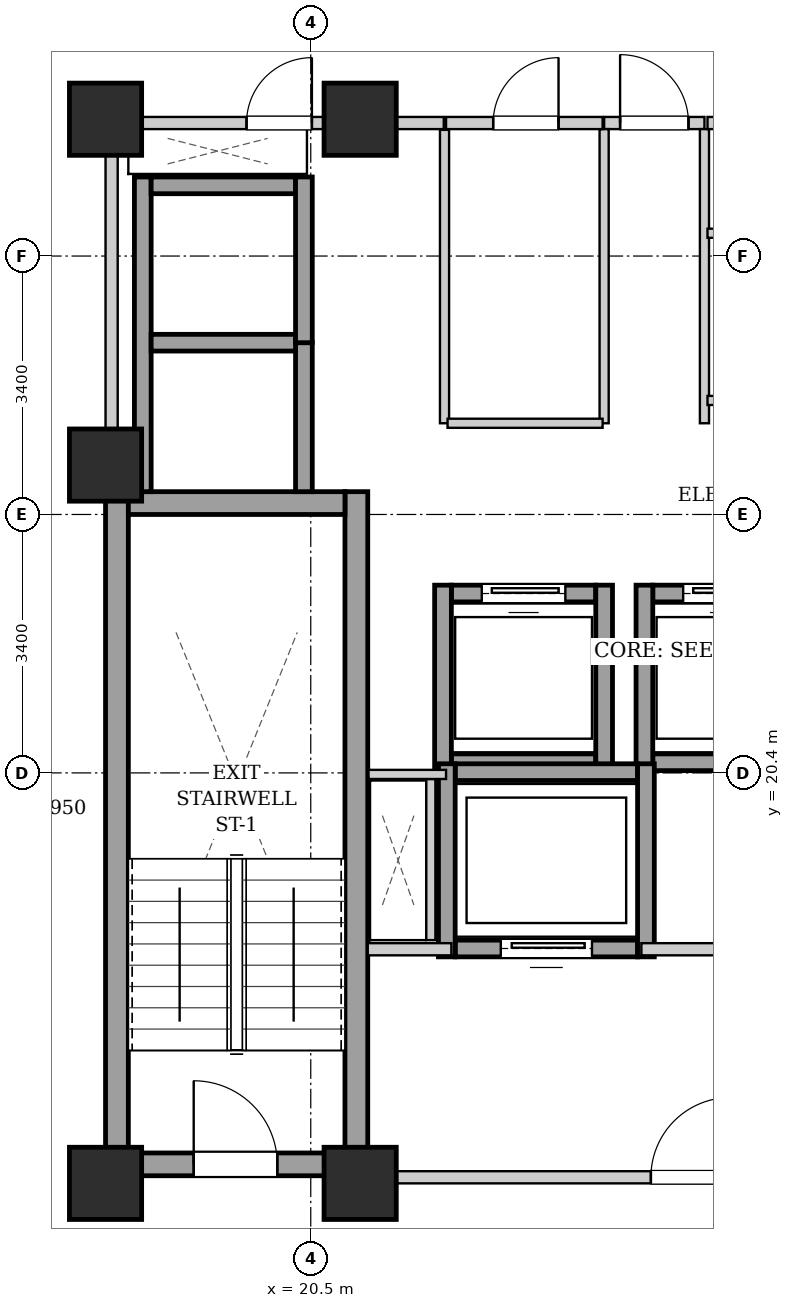
"""IFC4 building model, lengths in metres.
Left out: names, types, materials, properties, quantities, classifications, styles, units other than length and angle.
Written with IfcOpenShell. Run it as: python <this file> out.ifc"""

import sys

from ifc_helpers import new_model, si_unit, direction, frame, frame_2d, origin, origin_2d, place, context, subcontext, project, spatial, rectangle, extrude, element, fill, save


model = new_model("IFC4")
c1 = context("Model", 3, precision=1e-05, world=origin(), true_north=direction((0.0, 1.0)))
c2 = subcontext(c1, "Body", "Model", "MODEL_VIEW")
j1 = project(units=[si_unit("LENGTHUNIT", "METRE"), si_unit("PLANEANGLEUNIT", "RADIAN")], contexts=[c1])
p1 = place(None, origin())
s1 = spatial("IfcSite", under=j1, at=p1, CompositionType="ELEMENT")
p2 = place(p1, origin())
s2 = spatial("IfcBuilding", under=s1, at=p2, CompositionType="ELEMENT")
p3 = place(p2, frame((0.0, 0.0, 156.9)))
s3 = spatial("IfcBuildingStorey", under=s2, at=p3, CompositionType="ELEMENT", Elevation=156.9)
for number, where, z_axis, x_axis in (
    (1, (17.8, 15.0, 0.0), (0.0, 0.0, 1.0), (1.0, 0.0, 0.0)),
    (2, (21.15, 15.0, 0.0), (0.0, 0.0, 1.0), (1.0, 0.0, 0.0)),
    (3, (17.8, 29.0, 0.0), (0.0, 0.0, 1.0), (1.0, 0.0, 0.0)),
    (4, (21.15, 29.0, 0.0), (0.0, 0.0, 1.0), (1.0, 0.0, 0.0)),
    (5, (17.8, 24.45, 0.0), (0.0, 0.0, 1.0), (1.0, 0.0, 0.0)),
):
    element("IfcColumn", number, at=place(p3, frame(where, z_axis=z_axis, x_axis=x_axis)), inside=s3, PredefinedType="COLUMN", context=c2, shape_type="SweptSolid", body=[
        extrude(rectangle(XDim=0.95, YDim=0.95, at=origin_2d()), origin(), (0.0, 0.0, 1.0), 3.25),
    ])
for number, where, z_axis, x_axis in (
    (6, (17.95, 15.1, 0.0), (0.0, 0.0, 1.0), (0.0, 1.0, 0.0)),
    (7, (21.1, 15.1, 0.0), (0.0, 0.0, 1.0), (0.0, 1.0, 0.0)),
):
    element("IfcWall", number, at=place(p3, frame(where, z_axis=z_axis, x_axis=x_axis)), inside=s3, PredefinedType="SHEAR", context=c2, shape_type="SweptSolid", body=[
        extrude(rectangle(XDim=9.0, YDim=0.3, at=frame_2d((4.5, 0.0))), origin(), (0.0, 0.0, 1.0), 2.99),
    ])
p4 = place(p3, frame((18.1, 23.95, 0.0), z_axis=(0.0, 0.0, 1.0), x_axis=(1.0, 0.0, 0.0)))
e8 = element("IfcWall", 8, at=p4, inside=s3, PredefinedType="SHEAR", context=c2, shape_type="SweptSolid", body=[
    extrude(rectangle(XDim=2.85, YDim=0.3, at=frame_2d((1.425, 0.0))), origin(), (0.0, 0.0, 1.0), 2.99),
])
p5 = place(p3, frame((18.1, 15.25, 0.0), z_axis=(0.0, 0.0, 1.0), x_axis=(1.0, 0.0, 0.0)))
e9 = element("IfcWall", 9, at=p5, inside=s3, PredefinedType="SHEAR", context=c2, shape_type="SweptSolid", body=[
    extrude(rectangle(XDim=2.85, YDim=0.3, at=frame_2d((1.425, 0.0))), origin(), (0.0, 0.0, 1.0), 2.99),
])
p6 = place(p5, frame((0.86, 0.0, 0.0)))
e10 = element("IfcOpeningElement", 10, at=p6, cuts=e9, PredefinedType="OPENING", context=c2, shape_type="SweptSolid", body=[
    extrude(rectangle(XDim=1.1, YDim=2.05, at=frame_2d((0.55, 1.025))), frame((0.0, 0.16, 0.0), z_axis=(0.0, -1.0, 0.0), x_axis=(1.0, 0.0, 0.0)), (0.0, 0.0, 1.0), 0.32),
])
p7 = place(p3, frame((22.35, 20.54, 0.0), z_axis=(0.0, 0.0, 1.0), x_axis=(1.0, 0.0, 0.0)))
e11 = element("IfcWall", 11, at=p7, inside=s3, PredefinedType="SHEAR", context=c2, shape_type="SweptSolid", body=[
    extrude(rectangle(XDim=1.9, YDim=0.22, at=frame_2d((0.95, 0.0))), origin(), (0.0, 0.0, 1.0), 2.99),
])
p8 = place(p3, frame((22.35, 22.76, 0.0), z_axis=(0.0, 0.0, 1.0), x_axis=(1.0, 0.0, 0.0)))
e12 = element("IfcWall", 12, at=p8, inside=s3, PredefinedType="SHEAR", context=c2, shape_type="SweptSolid", body=[
    extrude(rectangle(XDim=1.9, YDim=0.22, at=frame_2d((0.95, 0.0))), origin(), (0.0, 0.0, 1.0), 2.99),
])
p9 = place(p8, frame((0.4, 0.0, 0.0)))
e13 = element("IfcOpeningElement", 13, at=p9, cuts=e12, PredefinedType="OPENING", context=c2, shape_type="SweptSolid", body=[
    extrude(rectangle(XDim=1.1, YDim=2.15, at=frame_2d((0.55, 1.075))), frame((0.0, 0.12, 0.0), z_axis=(0.0, -1.0, 0.0), x_axis=(1.0, 0.0, 0.0)), (0.0, 0.0, 1.0), 0.24),
])
for number, where, z_axis, x_axis in (
    (14, (22.24, 20.43, 0.0), (0.0, 0.0, 1.0), (0.0, 1.0, 0.0)),
    (15, (24.36, 20.43, 0.0), (0.0, 0.0, 1.0), (0.0, 1.0, 0.0)),
):
    element("IfcWall", number, at=place(p3, frame(where, z_axis=z_axis, x_axis=x_axis)), inside=s3, PredefinedType="SHEAR", context=c2, shape_type="SweptSolid", body=[
        extrude(rectangle(XDim=2.44, YDim=0.22, at=frame_2d((1.22, 0.0))), origin(), (0.0, 0.0, 1.0), 2.99),
    ])
p10 = place(p3, frame((25.0, 20.54, 0.0), z_axis=(0.0, 0.0, 1.0), x_axis=(1.0, 0.0, 0.0)))
e16 = element("IfcWall", 16, at=p10, inside=s3, PredefinedType="SHEAR", context=c2, shape_type="SweptSolid", body=[
    extrude(rectangle(XDim=1.9, YDim=0.22, at=frame_2d((0.95, 0.0))), origin(), (0.0, 0.0, 1.0), 2.99),
])
p11 = place(p3, frame((25.0, 22.76, 0.0), z_axis=(0.0, 0.0, 1.0), x_axis=(1.0, 0.0, 0.0)))
e17 = element("IfcWall", 17, at=p11, inside=s3, PredefinedType="SHEAR", context=c2, shape_type="SweptSolid", body=[
    extrude(rectangle(XDim=1.9, YDim=0.22, at=frame_2d((0.95, 0.0))), origin(), (0.0, 0.0, 1.0), 2.99),
])
p12 = place(p11, frame((0.4, 0.0, 0.0)))
e18 = element("IfcOpeningElement", 18, at=p12, cuts=e17, PredefinedType="OPENING", context=c2, shape_type="SweptSolid", body=[
    extrude(rectangle(XDim=1.1, YDim=2.15, at=frame_2d((0.55, 1.075))), frame((0.0, 0.12, 0.0), z_axis=(0.0, -1.0, 0.0), x_axis=(1.0, 0.0, 0.0)), (0.0, 0.0, 1.0), 0.24),
])
p13 = place(p3, frame((24.89, 20.43, 0.0), z_axis=(0.0, 0.0, 1.0), x_axis=(0.0, 1.0, 0.0)))
e19 = element("IfcWall", 19, at=p13, inside=s3, PredefinedType="SHEAR", context=c2, shape_type="SweptSolid", body=[
    extrude(rectangle(XDim=2.44, YDim=0.22, at=frame_2d((1.22, 0.0))), origin(), (0.0, 0.0, 1.0), 2.99),
])
p14 = place(p3, frame((18.29, 24.1, 0.0), z_axis=(0.0, 0.0, 1.0), x_axis=(0.0, 1.0, 0.0)))
e20 = element("IfcWall", 20, at=p14, inside=s3, PredefinedType="SHEAR", context=c2, shape_type="SweptSolid", body=[
    extrude(rectangle(XDim=4.14, YDim=0.22, at=frame_2d((2.07, 0.0))), origin(), (0.0, 0.0, 1.0), 2.99),
])
p15 = place(p3, frame((20.41, 24.1, 0.0), z_axis=(0.0, 0.0, 1.0), x_axis=(0.0, 1.0, 0.0)))
e21 = element("IfcWall", 21, at=p15, inside=s3, PredefinedType="SHEAR", context=c2, shape_type="SweptSolid", body=[
    extrude(rectangle(XDim=1.96, YDim=0.22, at=frame_2d((0.98, 0.0))), origin(), (0.0, 0.0, 1.0), 2.99),
])
for number, where, z_axis, x_axis in (
    (22, (18.4, 26.06, 0.0), (0.0, 0.0, 1.0), (1.0, 0.0, 0.0)),
    (23, (18.4, 28.13, 0.0), (0.0, 0.0, 1.0), (1.0, 0.0, 0.0)),
):
    element("IfcWall", number, at=place(p3, frame(where, z_axis=z_axis, x_axis=x_axis)), inside=s3, PredefinedType="SHEAR", context=c2, shape_type="SweptSolid", body=[
        extrude(rectangle(XDim=1.9, YDim=0.22, at=frame_2d((0.95, 0.0))), origin(), (0.0, 0.0, 1.0), 2.99),
    ])
p16 = place(p3, frame((20.41, 26.06, 0.0), z_axis=(0.0, 0.0, 1.0), x_axis=(0.0, 1.0, 0.0)))
e24 = element("IfcWall", 24, at=p16, inside=s3, PredefinedType="SHEAR", context=c2, shape_type="SweptSolid", body=[
    extrude(rectangle(XDim=2.18, YDim=0.22, at=frame_2d((1.09, 0.0))), origin(), (0.0, 0.0, 1.0), 2.99),
])
p17 = place(p3, frame((22.4, 18.09, 0.0), z_axis=(0.0, 0.0, 1.0), x_axis=(1.0, 0.0, 0.0)))
e25 = element("IfcWall", 25, at=p17, inside=s3, PredefinedType="SHEAR", context=c2, shape_type="SweptSolid", body=[
    extrude(rectangle(XDim=2.4, YDim=0.22, at=frame_2d((1.2, 0.0))), origin(), (0.0, 0.0, 1.0), 2.99),
])
p18 = place(p17, frame((0.6, 0.0, 0.0)))
e26 = element("IfcOpeningElement", 26, at=p18, cuts=e25, PredefinedType="OPENING", context=c2, shape_type="SweptSolid", body=[
    extrude(rectangle(XDim=1.2, YDim=2.15, at=frame_2d((0.6, 1.075))), frame((0.0, 0.12, 0.0), z_axis=(0.0, -1.0, 0.0), x_axis=(1.0, 0.0, 0.0)), (0.0, 0.0, 1.0), 0.24),
])
p19 = place(p3, frame((22.4, 20.41, 0.0), z_axis=(0.0, 0.0, 1.0), x_axis=(1.0, 0.0, 0.0)))
e27 = element("IfcWall", 27, at=p19, inside=s3, PredefinedType="SHEAR", context=c2, shape_type="SweptSolid", body=[
    extrude(rectangle(XDim=2.4, YDim=0.22, at=frame_2d((1.2, 0.0))), origin(), (0.0, 0.0, 1.0), 2.99),
])
for number, where, z_axis, x_axis in (
    (28, (22.29, 17.98, 0.0), (0.0, 0.0, 1.0), (0.0, 1.0, 0.0)),
    (29, (24.91, 17.98, 0.0), (0.0, 0.0, 1.0), (0.0, 1.0, 0.0)),
):
    element("IfcWall", number, at=place(p3, frame(where, z_axis=z_axis, x_axis=x_axis)), inside=s3, PredefinedType="SHEAR", context=c2, shape_type="SweptSolid", body=[
        extrude(rectangle(XDim=2.54, YDim=0.22, at=frame_2d((1.27, 0.0))), origin(), (0.0, 0.0, 1.0), 2.99),
    ])
p20 = place(p3, frame((21.25, 15.08, 0.0), z_axis=(0.0, 0.0, 1.0), x_axis=(1.0, 0.0, 0.0)))
e30 = element("IfcWall", 30, at=p20, inside=s3, PredefinedType="PARTITIONING", context=c2, shape_type="SweptSolid", body=[
    extrude(rectangle(XDim=8.5, YDim=0.16, at=frame_2d((4.25, 0.0))), origin(), (0.0, 0.0, 1.0), 2.442),
])
p21 = place(p20, frame((3.725, 0.0, 0.0)))
e31 = element("IfcOpeningElement", 31, at=p21, cuts=e30, PredefinedType="OPENING", context=c2, shape_type="SweptSolid", body=[
    extrude(rectangle(XDim=1.05, YDim=2.05, at=frame_2d((0.525, 1.025))), frame((0.0, 0.09, 0.0), z_axis=(0.0, -1.0, 0.0), x_axis=(1.0, 0.0, 0.0)), (0.0, 0.0, 1.0), 0.18),
])
p22 = place(p3, frame((21.25, 18.08, 0.0), z_axis=(0.0, 0.0, 1.0), x_axis=(1.0, 0.0, 0.0)))
e32 = element("IfcWall", 32, at=p22, inside=s3, PredefinedType="PARTITIONING", context=c2, shape_type="SweptSolid", body=[
    extrude(rectangle(XDim=1.1, YDim=0.16, at=frame_2d((0.55, 0.0))), origin(), (0.0, 0.0, 1.0), 2.99),
])
p23 = place(p3, frame((24.85, 18.08, 0.0), z_axis=(0.0, 0.0, 1.0), x_axis=(1.0, 0.0, 0.0)))
e33 = element("IfcWall", 33, at=p23, inside=s3, PredefinedType="PARTITIONING", context=c2, shape_type="SweptSolid", body=[
    extrude(rectangle(XDim=1.3, YDim=0.16, at=frame_2d((0.65, 0.0))), origin(), (0.0, 0.0, 1.0), 2.99),
])
p24 = place(p3, frame((17.88, 24.12, 0.0), z_axis=(0.0, 0.0, 1.0), x_axis=(0.0, 1.0, 0.0)))
e34 = element("IfcWall", 34, at=p24, inside=s3, PredefinedType="PARTITIONING", context=c2, shape_type="SweptSolid", body=[
    extrude(rectangle(XDim=4.76, YDim=0.16, at=frame_2d((2.38, 0.0))), origin(), (0.0, 0.0, 1.0), 2.325),
])
p25 = place(p3, frame((24.36, 28.95, 0.0), z_axis=(0.0, 0.0, 1.0), x_axis=(1.0, 0.0, 0.0)))
e35 = element("IfcWall", 35, at=p25, inside=s3, PredefinedType="PARTITIONING", context=c2, shape_type="SweptSolid", body=[
    extrude(rectangle(XDim=1.32, YDim=0.16, at=frame_2d((0.66, 0.0))), origin(), (0.0, 0.0, 1.0), 2.442),
])
p26 = place(p25, frame((0.21, 0.0, 0.0)))
e36 = element("IfcOpeningElement", 36, at=p26, cuts=e35, PredefinedType="OPENING", context=c2, shape_type="SweptSolid", body=[
    extrude(rectangle(XDim=0.9, YDim=2.05, at=frame_2d((0.45, 1.025))), frame((0.0, 0.09, 0.0), z_axis=(0.0, -1.0, 0.0), x_axis=(1.0, 0.0, 0.0)), (0.0, 0.0, 1.0), 0.18),
])
p27 = place(p3, frame((17.96, 28.95, 0.0), z_axis=(0.0, 0.0, 1.0), x_axis=(1.0, 0.0, 0.0)))
e37 = element("IfcWall", 37, at=p27, inside=s3, PredefinedType="PARTITIONING", context=c2, shape_type="SweptSolid", body=[
    extrude(rectangle(XDim=4.29, YDim=0.16, at=frame_2d((2.145, 0.0))), origin(), (0.0, 0.0, 1.0), 2.442),
])
p28 = place(p27, frame((1.695, 0.0, 0.0)))
e38 = element("IfcOpeningElement", 38, at=p28, cuts=e37, PredefinedType="OPENING", context=c2, shape_type="SweptSolid", body=[
    extrude(rectangle(XDim=0.86, YDim=2.05, at=frame_2d((0.43, 1.025))), frame((0.0, 0.09, 0.0), z_axis=(0.0, -1.0, 0.0), x_axis=(1.0, 0.0, 0.0)), (0.0, 0.0, 1.0), 0.18),
])
p29 = place(p3, frame((22.08, 18.2, 0.0), z_axis=(0.0, 0.0, 1.0), x_axis=(0.0, 1.0, 0.0)))
e39 = element("IfcWall", 39, at=p29, inside=s3, PredefinedType="PARTITIONING", context=c2, shape_type="SweptSolid", body=[
    extrude(rectangle(XDim=2.12, YDim=0.12, at=frame_2d((1.06, 0.0))), origin(), (0.0, 0.0, 1.0), 2.99),
])
p30 = place(p3, frame((22.28, 20.38, 0.0), z_axis=(0.0, 0.0, 1.0), x_axis=(-1.0, 0.0, 0.0)))
e40 = element("IfcWall", 40, at=p30, inside=s3, PredefinedType="PARTITIONING", context=c2, shape_type="SweptSolid", body=[
    extrude(rectangle(XDim=1.02, YDim=0.12, at=frame_2d((0.51, 0.0))), origin(), (0.0, 0.0, 1.0), 2.99),
])
for number, where, z_axis, x_axis in (
    (41, (24.36, 25.0, 0.0), (0.0, 0.0, 1.0), (0.0, 1.0, 0.0)),
    (42, (25.68, 25.0, 0.0), (0.0, 0.0, 1.0), (0.0, 1.0, 0.0)),
):
    element("IfcWall", number, at=place(p3, frame(where, z_axis=z_axis, x_axis=x_axis)), inside=s3, PredefinedType="PARTITIONING", context=c2, shape_type="SweptSolid", body=[
        extrude(rectangle(XDim=3.87, YDim=0.12, at=frame_2d((1.935, 0.0))), origin(), (0.0, 0.0, 1.0), 2.99),
    ])
p31 = place(p3, frame((22.26, 25.0, 0.0), z_axis=(0.0, 0.0, 1.0), x_axis=(0.0, 1.0, 0.0)))
e43 = element("IfcWall", 43, at=p31, inside=s3, PredefinedType="PARTITIONING", context=c2, shape_type="SweptSolid", body=[
    extrude(rectangle(XDim=3.86, YDim=0.12, at=frame_2d((1.93, 0.0))), origin(), (0.0, 0.0, 1.0), 2.99),
])
p32 = place(p3, frame((22.3, 25.0, 0.0), z_axis=(0.0, 0.0, 1.0), x_axis=(1.0, 0.0, 0.0)))
e44 = element("IfcWall", 44, at=p32, inside=s3, PredefinedType="PARTITIONING", context=c2, shape_type="SweptSolid", body=[
    extrude(rectangle(XDim=2.04, YDim=0.12, at=frame_2d((1.02, 0.0))), origin(), (0.0, 0.0, 1.0), 2.99),
])
p33 = place(p3, frame((22.28, 28.95, 0.0), z_axis=(0.0, 0.0, 1.0), x_axis=(1.0, 0.0, 0.0)))
e45 = element("IfcWall", 45, at=p33, inside=s3, PredefinedType="PARTITIONING", context=c2, shape_type="SweptSolid", body=[
    extrude(rectangle(XDim=2.06, YDim=0.16, at=frame_2d((1.03, 0.0))), origin(), (0.0, 0.0, 1.0), 2.442),
])
p34 = place(p33, frame((0.62, 0.0, 0.0)))
e46 = element("IfcOpeningElement", 46, at=p34, cuts=e45, PredefinedType="OPENING", context=c2, shape_type="SweptSolid", body=[
    extrude(rectangle(XDim=0.86, YDim=2.05, at=frame_2d((0.43, 1.025))), frame((0.0, 0.09, 0.0), z_axis=(0.0, -1.0, 0.0), x_axis=(1.0, 0.0, 0.0)), (0.0, 0.0, 1.0), 0.18),
])
p35 = place(p3, frame((25.72, 27.5, 0.0), z_axis=(0.0, 0.0, 1.0), x_axis=(1.0, 0.0, 0.0)))
e47 = element("IfcWall", 47, at=p35, inside=s3, PredefinedType="PARTITIONING", context=c2, shape_type="SweptSolid", body=[
    extrude(rectangle(XDim=4.36, YDim=0.12, at=frame_2d((2.18, 0.0))), origin(), (0.0, 0.0, 1.0), 2.99),
])
p36 = place(p3, frame((25.72, 25.3, 0.0), z_axis=(0.0, 0.0, 1.0), x_axis=(1.0, 0.0, 0.0)))
e48 = element("IfcWall", 48, at=p36, inside=s3, PredefinedType="PARTITIONING", context=c2, shape_type="SweptSolid", body=[
    extrude(rectangle(XDim=4.32, YDim=0.12, at=frame_2d((2.16, 0.0))), origin(), (0.0, 0.0, 1.0), 2.99),
])
p37 = place(p36, frame((1.65, 0.0, 0.0)))
e49 = element("IfcOpeningElement", 49, at=p37, cuts=e48, PredefinedType="OPENING", context=c2, shape_type="SweptSolid", body=[
    extrude(rectangle(XDim=0.9, YDim=2.05, at=frame_2d((0.45, 1.025))), frame((0.0, 0.07, 0.0), z_axis=(0.0, -1.0, 0.0), x_axis=(1.0, 0.0, 0.0)), (0.0, 0.0, 1.0), 0.14),
])
p38 = place(p3, frame((25.72, 28.95, 0.0), z_axis=(0.0, 0.0, 1.0), x_axis=(1.0, 0.0, 0.0)))
e50 = element("IfcWall", 50, at=p38, inside=s3, PredefinedType="PARTITIONING", context=c2, shape_type="SweptSolid", body=[
    extrude(rectangle(XDim=7.32, YDim=0.16, at=frame_2d((3.66, 0.0))), origin(), (0.0, 0.0, 1.0), 2.442),
])
p39 = place(p38, frame((1.27, 0.0, 0.0)))
e51 = element("IfcOpeningElement", 51, at=p39, cuts=e50, PredefinedType="OPENING", context=c2, shape_type="SweptSolid", body=[
    extrude(rectangle(XDim=0.86, YDim=2.05, at=frame_2d((0.43, 1.025))), frame((0.0, 0.09, 0.0), z_axis=(0.0, -1.0, 0.0), x_axis=(1.0, 0.0, 0.0)), (0.0, 0.0, 1.0), 0.18),
])
p40 = place(p6, origin())
e52 = element("IfcDoor", 52, at=p40, inside=s3, OperationType="SINGLE_SWING_LEFT", PredefinedType="DOOR", context=c2, shape_type="SweptSolid", body=[
    extrude(rectangle(XDim=1.1, YDim=2.05, at=frame_2d((0.55, 1.025))), frame((0.0, 0.025, 0.0), z_axis=(0.0, -1.0, 0.0), x_axis=(1.0, 0.0, 0.0)), (0.0, 0.0, 1.0), 0.05),
])
fill(e10, e52)
p41 = place(p9, origin())
e53 = element("IfcDoor", 53, at=p41, inside=s3, OperationType="SLIDING_TO_LEFT", PredefinedType="DOOR", context=c2, shape_type="SweptSolid", body=[
    extrude(rectangle(XDim=1.1, YDim=2.15, at=frame_2d((0.55, 1.075))), frame((0.0, 0.025, 0.0), z_axis=(0.0, -1.0, 0.0), x_axis=(1.0, 0.0, 0.0)), (0.0, 0.0, 1.0), 0.05),
])
fill(e13, e53)
p42 = place(p12, origin())
e54 = element("IfcDoor", 54, at=p42, inside=s3, OperationType="SLIDING_TO_LEFT", PredefinedType="DOOR", context=c2, shape_type="SweptSolid", body=[
    extrude(rectangle(XDim=1.1, YDim=2.15, at=frame_2d((0.55, 1.075))), frame((0.0, 0.025, 0.0), z_axis=(0.0, -1.0, 0.0), x_axis=(1.0, 0.0, 0.0)), (0.0, 0.0, 1.0), 0.05),
])
fill(e18, e54)
p43 = place(p18, origin())
e55 = element("IfcDoor", 55, at=p43, inside=s3, OperationType="SLIDING_TO_LEFT", PredefinedType="DOOR", context=c2, shape_type="SweptSolid", body=[
    extrude(rectangle(XDim=1.2, YDim=2.15, at=frame_2d((0.6, 1.075))), frame((0.0, 0.025, 0.0), z_axis=(0.0, -1.0, 0.0), x_axis=(1.0, 0.0, 0.0)), (0.0, 0.0, 1.0), 0.05),
])
fill(e26, e55)
p44 = place(p21, origin())
e56 = element("IfcDoor", 56, at=p44, inside=s3, OperationType="SINGLE_SWING_RIGHT", PredefinedType="DOOR", context=c2, shape_type="SweptSolid", body=[
    extrude(rectangle(XDim=1.05, YDim=2.05, at=frame_2d((0.525, 1.025))), frame((0.0, 0.025, 0.0), z_axis=(0.0, -1.0, 0.0), x_axis=(1.0, 0.0, 0.0)), (0.0, 0.0, 1.0), 0.05),
])
fill(e31, e56)
p45 = place(p26, origin())
e57 = element("IfcDoor", 57, at=p45, inside=s3, OperationType="SINGLE_SWING_LEFT", PredefinedType="DOOR", context=c2, shape_type="SweptSolid", body=[
    extrude(rectangle(XDim=0.9, YDim=2.05, at=frame_2d((0.45, 1.025))), frame((0.0, 0.025, 0.0), z_axis=(0.0, -1.0, 0.0), x_axis=(1.0, 0.0, 0.0)), (0.0, 0.0, 1.0), 0.05),
])
fill(e36, e57)
p46 = place(p28, origin())
e58 = element("IfcDoor", 58, at=p46, inside=s3, OperationType="SINGLE_SWING_RIGHT", PredefinedType="DOOR", context=c2, shape_type="SweptSolid", body=[
    extrude(rectangle(XDim=0.86, YDim=2.05, at=frame_2d((0.43, 1.025))), frame((0.0, 0.025, 0.0), z_axis=(0.0, -1.0, 0.0), x_axis=(1.0, 0.0, 0.0)), (0.0, 0.0, 1.0), 0.05),
])
fill(e38, e58)
p47 = place(p34, origin())
e59 = element("IfcDoor", 59, at=p47, inside=s3, OperationType="SINGLE_SWING_RIGHT", PredefinedType="DOOR", context=c2, shape_type="SweptSolid", body=[
    extrude(rectangle(XDim=0.86, YDim=2.05, at=frame_2d((0.43, 1.025))), frame((0.0, 0.025, 0.0), z_axis=(0.0, -1.0, 0.0), x_axis=(1.0, 0.0, 0.0)), (0.0, 0.0, 1.0), 0.05),
])
fill(e46, e59)
save(model, sys.argv[1])
